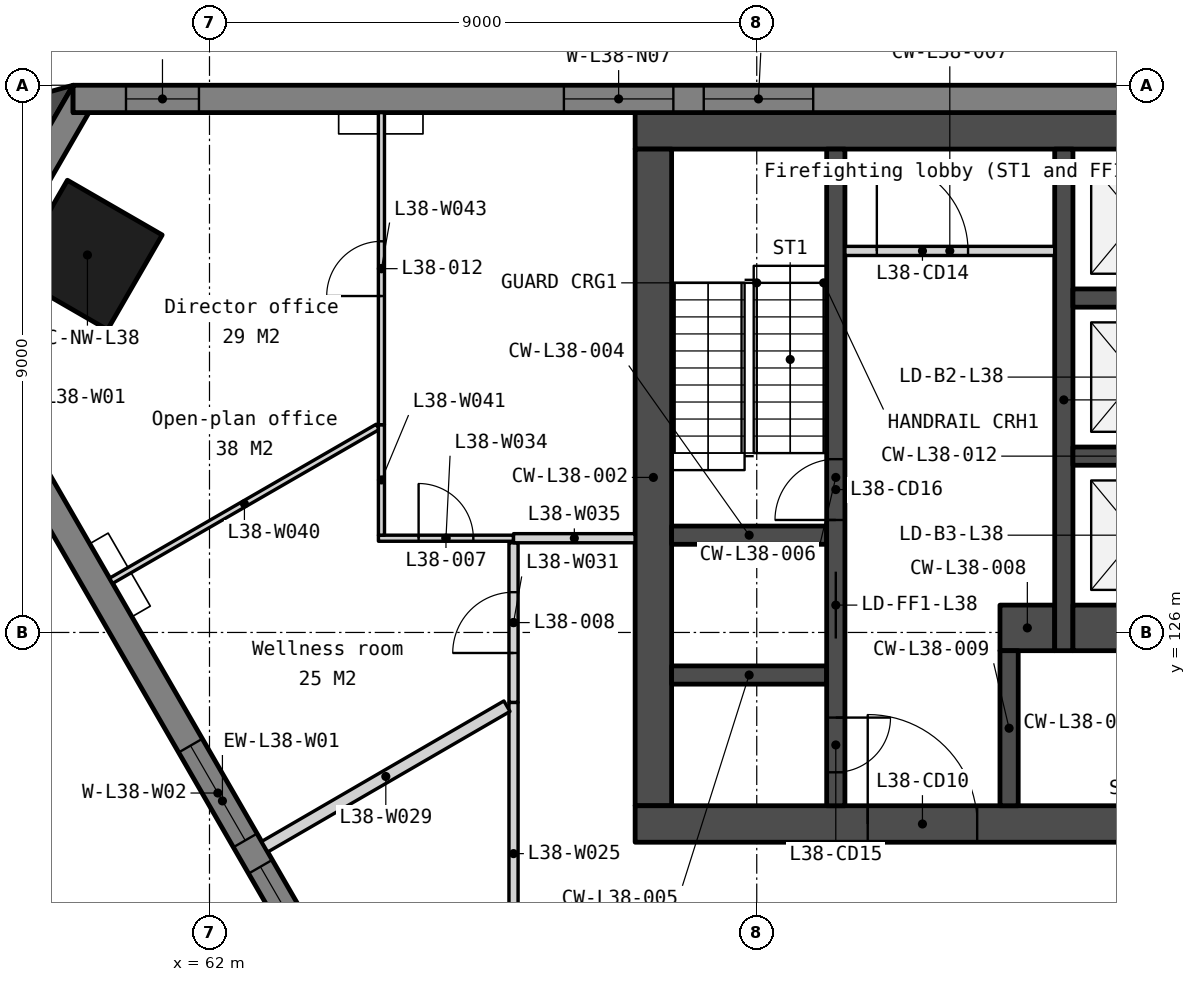
"""IFC4 building model, lengths in metres.
Left out: names, types, materials, properties, quantities, classifications, styles, units other than length and angle.
Written with IfcOpenShell. Run it as: python <this file> out.ifc"""

import sys

from ifc_helpers import new_model, si_unit, direction, frame, frame_2d, origin, origin_2d, place, context, subcontext, project, spatial, polyline, rectangle, outline, extrude, element, fill, save


model = new_model("IFC4")
c1 = context("Model", 3, precision=1e-05, world=origin(), true_north=direction((0.0, 1.0)))
c2 = subcontext(c1, "Body", "Model", "MODEL_VIEW")
j1 = project(units=[si_unit("LENGTHUNIT", "METRE"), si_unit("PLANEANGLEUNIT", "RADIAN")], contexts=[c1])
p1 = place(None, origin())
s1 = spatial("IfcSite", under=j1, at=p1, CompositionType="ELEMENT")
p2 = place(p1, origin())
s2 = spatial("IfcBuilding", under=s1, at=p2, CompositionType="ELEMENT")
p3 = place(p2, frame((0.0, 0.0, 152.0)))
s3 = spatial("IfcBuildingStorey", under=s2, at=p3, CompositionType="ELEMENT", Elevation=152.0)
p4 = place(p3, frame((59.993, 132.208, 0.0), z_axis=(0.0, 0.0, 1.0), x_axis=(-0.5, -0.866025403784, 0.0)))
e1 = element("IfcColumn", 1, at=p4, inside=s3, PredefinedType="COLUMN", context=c2, shape_type="SweptSolid", body=[
    extrude(rectangle(XDim=1.8, YDim=1.8, at=origin_2d()), origin(), (0.0, 0.0, 1.0), 3.9),
])
p5 = place(p3, frame((69.0, 134.25, 0.0), z_axis=(0.0, 0.0, 1.0), x_axis=(1.0, 0.0, 0.0)))
e2 = element("IfcWall", 2, at=p5, inside=s3, PredefinedType="SOLIDWALL", context=c2, shape_type="SweptSolid", body=[
    extrude(rectangle(XDim=22.0, YDim=0.6, at=frame_2d((11.0, 0.0))), origin(), (0.0, 0.0, 1.0), 3.75),
])
p6 = place(p3, frame((69.3, 133.95, 0.0), z_axis=(0.0, 0.0, 1.0), x_axis=(0.0, -1.0, 0.0)))
e3 = element("IfcWall", 3, at=p6, inside=s3, PredefinedType="SOLIDWALL", context=c2, shape_type="SweptSolid", body=[
    extrude(rectangle(XDim=10.8, YDim=0.6, at=frame_2d((5.4, 0.0))), origin(), (0.0, 0.0, 1.0), 3.75),
])
p7 = place(p3, frame((69.0, 122.85, 0.0), z_axis=(0.0, 0.0, 1.0), x_axis=(1.0, 0.0, 0.0)))
e4 = element("IfcWall", 4, at=p7, inside=s3, PredefinedType="SOLIDWALL", context=c2, shape_type="SweptSolid", body=[
    extrude(rectangle(XDim=22.0, YDim=0.6, at=frame_2d((11.0, 0.0))), origin(), (0.0, 0.0, 1.0), 3.75),
])
p8 = place(p7, frame((16.375, 0.0, 0.0)))
e5 = element("IfcOpeningElement", 5, at=p8, cuts=e4, PredefinedType="OPENING", context=c2, shape_type="SweptSolid", body=[
    extrude(rectangle(XDim=1.8, YDim=2.1, at=frame_2d((0.9, 1.05))), frame((0.0, 0.31, 0.0), z_axis=(0.0, -1.0, 0.0), x_axis=(1.0, 0.0, 0.0)), (0.0, 0.0, 1.0), 0.62),
])
p9 = place(p7, frame((3.825, 0.0, 0.0)))
e6 = element("IfcOpeningElement", 6, at=p9, cuts=e4, PredefinedType="OPENING", context=c2, shape_type="SweptSolid", body=[
    extrude(rectangle(XDim=1.8, YDim=2.1, at=frame_2d((0.9, 1.05))), frame((0.0, 0.31, 0.0), z_axis=(0.0, -1.0, 0.0), x_axis=(1.0, 0.0, 0.0)), (0.0, 0.0, 1.0), 0.62),
])
p10 = place(p7, frame((12.85, 0.0, 0.0)))
e7 = element("IfcOpeningElement", 7, at=p10, cuts=e4, PredefinedType="OPENING", context=c2, shape_type="SweptSolid", body=[
    extrude(rectangle(XDim=1.5, YDim=2.1, at=frame_2d((0.75, 1.05))), frame((0.0, 0.31, 0.0), z_axis=(0.0, -1.0, 0.0), x_axis=(1.0, 0.0, 0.0)), (0.0, 0.0, 1.0), 0.62),
])
for number, where, z_axis, x_axis in (
    (8, (69.6, 127.6, 0.0), (0.0, 0.0, 1.0), (1.0, 0.0, 0.0)),
    (9, (69.6, 125.3, 0.0), (0.0, 0.0, 1.0), (1.0, 0.0, 0.0)),
):
    element("IfcWall", number, at=place(p3, frame(where, z_axis=z_axis, x_axis=x_axis)), inside=s3, PredefinedType="SOLIDWALL", context=c2, shape_type="SweptSolid", body=[
        extrude(rectangle(XDim=2.55, YDim=0.3, at=frame_2d((1.275, 0.0))), origin(), (0.0, 0.0, 1.0), 3.75),
    ])
p11 = place(p3, frame((72.3, 133.95, 0.0), z_axis=(0.0, 0.0, 1.0), x_axis=(0.0, -1.0, 0.0)))
e10 = element("IfcWall", 10, at=p11, inside=s3, PredefinedType="SOLIDWALL", context=c2, shape_type="SweptSolid", body=[
    extrude(rectangle(XDim=10.8, YDim=0.3, at=frame_2d((5.4, 0.0))), origin(), (0.0, 0.0, 1.0), 3.75),
])
p12 = place(p11, frame((6.95, 0.0, 0.0)))
e11 = element("IfcOpeningElement", 11, at=p12, cuts=e10, PredefinedType="OPENING", context=c2, shape_type="SweptSolid", body=[
    extrude(rectangle(XDim=1.1, YDim=2.1, at=frame_2d((0.55, 1.05))), frame((0.0, 0.16, 0.0), z_axis=(0.0, -1.0, 0.0), x_axis=(1.0, 0.0, 0.0)), (0.0, 0.0, 1.0), 0.32),
])
p13 = place(p11, frame((9.35, 0.0, 0.0)))
e12 = element("IfcOpeningElement", 12, at=p13, cuts=e10, PredefinedType="OPENING", context=c2, shape_type="SweptSolid", body=[
    extrude(rectangle(XDim=0.9, YDim=2.1, at=frame_2d((0.45, 1.05))), frame((0.0, 0.16, 0.0), z_axis=(0.0, -1.0, 0.0), x_axis=(1.0, 0.0, 0.0)), (0.0, 0.0, 1.0), 0.32),
])
p14 = place(p11, frame((5.1, 0.0, 0.0)))
e13 = element("IfcOpeningElement", 13, at=p14, cuts=e10, PredefinedType="OPENING", context=c2, shape_type="SweptSolid", body=[
    extrude(rectangle(XDim=1.0, YDim=2.1, at=frame_2d((0.5, 1.05))), frame((0.0, 0.16, 0.0), z_axis=(0.0, -1.0, 0.0), x_axis=(1.0, 0.0, 0.0)), (0.0, 0.0, 1.0), 0.32),
])
p15 = place(p3, frame((72.45, 132.275, 0.0), z_axis=(0.0, 0.0, 1.0), x_axis=(1.0, 0.0, 0.0)))
e14 = element("IfcWall", 14, at=p15, inside=s3, PredefinedType="PARTITIONING", context=c2, shape_type="SweptSolid", body=[
    extrude(rectangle(XDim=3.45, YDim=0.15, at=frame_2d((1.725, 0.0))), origin(), (0.0, 0.0, 1.0), 3.75),
])
p16 = place(p15, frame((0.525, 0.0, 0.0)))
e15 = element("IfcOpeningElement", 15, at=p16, cuts=e14, PredefinedType="OPENING", context=c2, shape_type="SweptSolid", body=[
    extrude(rectangle(XDim=1.5, YDim=2.1, at=frame_2d((0.75, 1.05))), frame((0.0, 0.085, 0.0), z_axis=(0.0, -1.0, 0.0), x_axis=(1.0, 0.0, 0.0)), (0.0, 0.0, 1.0), 0.17),
])
p17 = place(p3, frame((75.0, 126.075, 0.0), z_axis=(0.0, 0.0, 1.0), x_axis=(1.0, 0.0, 0.0)))
e16 = element("IfcWall", 16, at=p17, inside=s3, PredefinedType="SOLIDWALL", context=c2, shape_type="SweptSolid", body=[
    extrude(rectangle(XDim=0.9, YDim=0.75, at=frame_2d((0.45, 0.0))), origin(), (0.0, 0.0, 1.0), 3.75),
])
p18 = place(p3, frame((75.15, 125.7, 0.0), z_axis=(0.0, 0.0, 1.0), x_axis=(0.0, -1.0, 0.0)))
e17 = element("IfcWall", 17, at=p18, inside=s3, PredefinedType="SOLIDWALL", context=c2, shape_type="SweptSolid", body=[
    extrude(rectangle(XDim=2.55, YDim=0.3, at=frame_2d((1.275, 0.0))), origin(), (0.0, 0.0, 1.0), 3.75),
])
p19 = place(p3, frame((76.05, 133.95, 0.0), z_axis=(0.0, 0.0, 1.0), x_axis=(0.0, -1.0, 0.0)))
e18 = element("IfcWall", 18, at=p19, inside=s3, PredefinedType="SOLIDWALL", context=c2, shape_type="SweptSolid", body=[
    extrude(rectangle(XDim=8.25, YDim=0.3, at=frame_2d((4.125, 0.0))), origin(), (0.0, 0.0, 1.0), 3.75),
])
for number, where, z_axis, x_axis in (
    (19, (76.2, 131.5, 0.0), (0.0, 0.0, 1.0), (1.0, 0.0, 0.0)),
    (20, (76.2, 128.9, 0.0), (0.0, 0.0, 1.0), (1.0, 0.0, 0.0)),
):
    element("IfcWall", number, at=place(p3, frame(where, z_axis=z_axis, x_axis=x_axis)), inside=s3, PredefinedType="SOLIDWALL", context=c2, shape_type="SweptSolid", body=[
        extrude(rectangle(XDim=2.1, YDim=0.3, at=frame_2d((1.05, 0.0))), origin(), (0.0, 0.0, 1.0), 3.75),
    ])
p20 = place(p3, frame((76.2, 126.075, 0.0), z_axis=(0.0, 0.0, 1.0), x_axis=(1.0, 0.0, 0.0)))
e21 = element("IfcWall", 21, at=p20, inside=s3, PredefinedType="SOLIDWALL", context=c2, shape_type="SweptSolid", body=[
    extrude(rectangle(XDim=2.1, YDim=0.75, at=frame_2d((1.05, 0.0))), origin(), (0.0, 0.0, 1.0), 3.75),
])
p21 = place(p3, frame((0.0, 0.0, -0.15)))
e22 = element("IfcWall", 22, at=p21, inside=s3, PredefinedType="SOLIDWALL", context=c2, shape_type="SweptSolid", body=[
    extrude(outline(polyline([(59.757, 135.0), (59.757, 134.55), (60.017, 134.55), (57.977, 131.016), (57.847, 131.241), (57.457, 131.016), (59.757, 135.0)])), origin(), (0.0, 0.0, 1.0), 3.9),
])
p22 = place(p3, frame((100.243, 134.775, -0.15), z_axis=(0.0, 0.0, 1.0), x_axis=(-1.0, 0.0, 0.0)))
e23 = element("IfcWall", 23, at=p22, inside=s3, PredefinedType="SOLIDWALL", context=c2, shape_type="SweptSolid", body=[
    extrude(outline(polyline([(40.486, 0.0), (40.486, 3.9), (0.0, 3.9), (0.0, 0.0), (40.486, 0.0)])), frame((0.0, 0.225, 0.0), z_axis=(0.0, -1.0, 0.0), x_axis=(1.0, 0.0, 0.0)), (0.0, 0.0, 1.0), 0.45),
])
p23 = place(p22, frame((0.87, 0.0, 0.95)))
e24 = element("IfcOpeningElement", 24, at=p23, cuts=e23, PredefinedType="OPENING", context=c2, shape_type="SweptSolid", body=[
    extrude(rectangle(XDim=1.2, YDim=2.2, at=frame_2d((0.6, 1.1))), frame((0.0, 0.235, 0.0), z_axis=(0.0, -1.0, 0.0), x_axis=(1.0, 0.0, 0.0)), (0.0, 0.0, 1.0), 0.47),
])
p24 = place(p22, frame((8.072, 0.0, 0.95)))
e25 = element("IfcOpeningElement", 25, at=p24, cuts=e23, PredefinedType="OPENING", context=c2, shape_type="SweptSolid", body=[
    extrude(rectangle(XDim=1.8, YDim=2.2, at=frame_2d((0.9, 1.1))), frame((0.0, 0.235, 0.0), z_axis=(0.0, -1.0, 0.0), x_axis=(1.0, 0.0, 0.0)), (0.0, 0.0, 1.0), 0.47),
])
p25 = place(p22, frame((10.372, 0.0, 0.95)))
e26 = element("IfcOpeningElement", 26, at=p25, cuts=e23, PredefinedType="OPENING", context=c2, shape_type="SweptSolid", body=[
    extrude(rectangle(XDim=1.8, YDim=2.2, at=frame_2d((0.9, 1.1))), frame((0.0, 0.235, 0.0), z_axis=(0.0, -1.0, 0.0), x_axis=(1.0, 0.0, 0.0)), (0.0, 0.0, 1.0), 0.47),
])
p26 = place(p22, frame((18.193, 0.0, 0.95)))
e27 = element("IfcOpeningElement", 27, at=p26, cuts=e23, PredefinedType="OPENING", context=c2, shape_type="SweptSolid", body=[
    extrude(rectangle(XDim=1.8, YDim=2.2, at=frame_2d((0.9, 1.1))), frame((0.0, 0.235, 0.0), z_axis=(0.0, -1.0, 0.0), x_axis=(1.0, 0.0, 0.0)), (0.0, 0.0, 1.0), 0.47),
])
p27 = place(p22, frame((20.493, 0.0, 0.95)))
e28 = element("IfcOpeningElement", 28, at=p27, cuts=e23, PredefinedType="OPENING", context=c2, shape_type="SweptSolid", body=[
    extrude(rectangle(XDim=1.8, YDim=2.2, at=frame_2d((0.9, 1.1))), frame((0.0, 0.235, 0.0), z_axis=(0.0, -1.0, 0.0), x_axis=(1.0, 0.0, 0.0)), (0.0, 0.0, 1.0), 0.47),
])
p28 = place(p22, frame((28.315, 0.0, 0.95)))
e29 = element("IfcOpeningElement", 29, at=p28, cuts=e23, PredefinedType="OPENING", context=c2, shape_type="SweptSolid", body=[
    extrude(rectangle(XDim=1.8, YDim=2.2, at=frame_2d((0.9, 1.1))), frame((0.0, 0.235, 0.0), z_axis=(0.0, -1.0, 0.0), x_axis=(1.0, 0.0, 0.0)), (0.0, 0.0, 1.0), 0.47),
])
p29 = place(p22, frame((30.615, 0.0, 0.95)))
e30 = element("IfcOpeningElement", 30, at=p29, cuts=e23, PredefinedType="OPENING", context=c2, shape_type="SweptSolid", body=[
    extrude(rectangle(XDim=1.8, YDim=2.2, at=frame_2d((0.9, 1.1))), frame((0.0, 0.235, 0.0), z_axis=(0.0, -1.0, 0.0), x_axis=(1.0, 0.0, 0.0)), (0.0, 0.0, 1.0), 0.47),
])
p30 = place(p22, frame((38.417, 0.0, 0.95)))
e31 = element("IfcOpeningElement", 31, at=p30, cuts=e23, PredefinedType="OPENING", context=c2, shape_type="SweptSolid", body=[
    extrude(rectangle(XDim=1.2, YDim=2.2, at=frame_2d((0.6, 1.1))), frame((0.0, 0.235, 0.0), z_axis=(0.0, -1.0, 0.0), x_axis=(1.0, 0.0, 0.0)), (0.0, 0.0, 1.0), 0.47),
])
p31 = place(p3, frame((57.652, 131.129, -0.15), z_axis=(0.0, 0.0, 1.0), x_axis=(0.50000511266, -0.866022451969, 0.0)))
e32 = element("IfcWall", 32, at=p31, inside=s3, PredefinedType="SOLIDWALL", context=c2, shape_type="SweptSolid", body=[
    extrude(outline(polyline([(0.0, 0.0), (0.0, 3.9), (18.243, 3.9), (18.243, 0.0), (0.0, 0.0)])), frame((0.0, 0.225, 0.0), z_axis=(0.0, -1.0, 0.0), x_axis=(1.0, 0.0, 0.0)), (0.0, 0.0, 1.0), 0.45),
])
p32 = place(p31, frame((0.87, 0.0, 0.95)))
e33 = element("IfcOpeningElement", 33, at=p32, cuts=e32, PredefinedType="OPENING", context=c2, shape_type="SweptSolid", body=[
    extrude(rectangle(XDim=1.2, YDim=2.2, at=frame_2d((0.6, 1.1))), frame((0.0, 0.235, 0.0), z_axis=(0.0, -1.0, 0.0), x_axis=(1.0, 0.0, 0.0)), (0.0, 0.0, 1.0), 0.47),
])
p33 = place(p31, frame((8.072, 0.0, 0.95)))
e34 = element("IfcOpeningElement", 34, at=p33, cuts=e32, PredefinedType="OPENING", context=c2, shape_type="SweptSolid", body=[
    extrude(rectangle(XDim=1.8, YDim=2.2, at=frame_2d((0.9, 1.1))), frame((0.0, 0.235, 0.0), z_axis=(0.0, -1.0, 0.0), x_axis=(1.0, 0.0, 0.0)), (0.0, 0.0, 1.0), 0.47),
])
p34 = place(p31, frame((10.372, 0.0, 0.95)))
e35 = element("IfcOpeningElement", 35, at=p34, cuts=e32, PredefinedType="OPENING", context=c2, shape_type="SweptSolid", body=[
    extrude(rectangle(XDim=1.8, YDim=2.2, at=frame_2d((0.9, 1.1))), frame((0.0, 0.235, 0.0), z_axis=(0.0, -1.0, 0.0), x_axis=(1.0, 0.0, 0.0)), (0.0, 0.0, 1.0), 0.47),
])
p35 = place(p3, frame((0.0, 0.0, -0.15)))
e36 = element("IfcWall", 36, at=p35, inside=s3, PredefinedType="SOLIDWALL", context=c2, shape_type="SweptSolid", body=[
    extrude(outline(polyline([(59.757, 135.0), (56.512, 134.097), (57.457, 131.016), (59.757, 135.0)])), origin(), (0.0, 0.0, 1.0), 3.9),
])
p36 = place(p3, frame((67.0, 119.875, 0.0), z_axis=(0.0, 0.0, 1.0), x_axis=(0.0, 1.0, 0.0)))
e37 = element("IfcWall", 37, at=p36, inside=s3, PredefinedType="PARTITIONING", context=c2, shape_type="SweptSolid", body=[
    extrude(rectangle(XDim=4.975, YDim=0.15, at=frame_2d((2.487, 0.0))), origin(), (0.0, 0.0, 1.0), 3.75),
])
p37 = place(p3, frame((62.907, 122.476, 0.0), z_axis=(0.0, 0.0, 1.0), x_axis=(0.864998983095, 0.501773613539, 0.0)))
e38 = element("IfcWall", 38, at=p37, inside=s3, PredefinedType="PARTITIONING", context=c2, shape_type="SweptSolid", body=[
    extrude(rectangle(XDim=4.606, YDim=0.2, at=frame_2d((2.303, 0.0))), origin(), (0.0, 0.0, 1.0), 3.75),
])
p38 = place(p3, frame((67.0, 124.85, 0.0), z_axis=(0.0, 0.0, 1.0), x_axis=(0.0, 1.0, 0.0)))
e39 = element("IfcWall", 39, at=p38, inside=s3, PredefinedType="PARTITIONING", context=c2, shape_type="SweptSolid", body=[
    extrude(rectangle(XDim=2.625, YDim=0.15, at=frame_2d((1.312, 0.0))), origin(), (0.0, 0.0, 1.0), 3.75),
])
p39 = place(p38, frame((0.812, 0.0, 0.0)))
e40 = element("IfcOpeningElement", 40, at=p39, cuts=e39, PredefinedType="OPENING", context=c2, shape_type="SweptSolid", body=[
    extrude(rectangle(XDim=1.0, YDim=2.1, at=frame_2d((0.5, 1.05))), frame((0.0, 0.085, 0.0), z_axis=(0.0, -1.0, 0.0), x_axis=(1.0, 0.0, 0.0)), (0.0, 0.0, 1.0), 0.17),
])
p40 = place(p3, frame((64.778, 127.55, 0.0), z_axis=(0.0, 0.0, 1.0), x_axis=(1.0, 0.0, 0.0)))
e41 = element("IfcWall", 41, at=p40, inside=s3, PredefinedType="PARTITIONING", context=c2, shape_type="SweptSolid", body=[
    extrude(rectangle(XDim=2.222, YDim=0.1, at=frame_2d((1.111, 0.0))), origin(), (0.0, 0.0, 1.0), 3.75),
])
p41 = place(p40, frame((0.661, 0.0, 0.0)))
e42 = element("IfcOpeningElement", 42, at=p41, cuts=e41, PredefinedType="OPENING", context=c2, shape_type="SweptSolid", body=[
    extrude(rectangle(XDim=0.9, YDim=2.1, at=frame_2d((0.45, 1.05))), frame((0.0, 0.06, 0.0), z_axis=(0.0, -1.0, 0.0), x_axis=(1.0, 0.0, 0.0)), (0.0, 0.0, 1.0), 0.12),
])
p42 = place(p3, frame((67.0, 127.55, 0.0), z_axis=(0.0, 0.0, 1.0), x_axis=(1.0, 0.0, 0.0)))
e43 = element("IfcWall", 43, at=p42, inside=s3, PredefinedType="PARTITIONING", context=c2, shape_type="SweptSolid", body=[
    extrude(rectangle(XDim=2.0, YDim=0.15, at=frame_2d((1.0, 0.0))), origin(), (0.0, 0.0, 1.0), 3.75),
])
p43 = place(p3, frame((60.382, 126.85, 0.0), z_axis=(0.0, 0.0, 1.0), x_axis=(0.866041859802, 0.499971496258, 0.0)))
e44 = element("IfcWall", 44, at=p43, inside=s3, PredefinedType="PARTITIONING", context=c2, shape_type="SweptSolid", body=[
    extrude(rectangle(XDim=5.063, YDim=0.1, at=frame_2d((2.532, 0.0))), origin(), (0.0, 0.0, 1.0), 3.75),
])
p44 = place(p3, frame((64.828, 127.6, 0.0), z_axis=(0.0, 0.0, 1.0), x_axis=(-0.000268781068, 0.999999963878, 0.0)))
e45 = element("IfcWall", 45, at=p44, inside=s3, PredefinedType="PARTITIONING", context=c2, shape_type="SweptSolid", body=[
    extrude(rectangle(XDim=1.817, YDim=0.1, at=frame_2d((0.908, 0.0))), origin(), (0.0, 0.0, 1.0), 3.75),
])
p45 = place(p3, frame((64.828, 129.417, 0.0), z_axis=(0.0, 0.0, 1.0), x_axis=(0.0, 1.0, 0.0)))
e46 = element("IfcWall", 46, at=p45, inside=s3, PredefinedType="PARTITIONING", context=c2, shape_type="SweptSolid", body=[
    extrude(rectangle(XDim=5.133, YDim=0.1, at=frame_2d((2.567, 0.0))), origin(), (0.0, 0.0, 1.0), 3.75),
])
p46 = place(p45, frame((2.117, 0.0, 0.0)))
e47 = element("IfcOpeningElement", 47, at=p46, cuts=e46, PredefinedType="OPENING", context=c2, shape_type="SweptSolid", body=[
    extrude(rectangle(XDim=0.9, YDim=2.1, at=frame_2d((0.45, 1.05))), frame((0.0, 0.06, 0.0), z_axis=(0.0, -1.0, 0.0), x_axis=(1.0, 0.0, 0.0)), (0.0, 0.0, 1.0), 0.12),
])
p47 = place(p12, origin())
e48 = element("IfcDoor", 48, at=p47, inside=s3, OperationType="SLIDING_TO_LEFT", PredefinedType="DOOR", context=c2, shape_type="SweptSolid", body=[
    extrude(rectangle(XDim=1.1, YDim=2.1, at=frame_2d((0.55, 1.05))), frame((0.0, 0.025, 0.0), z_axis=(0.0, -1.0, 0.0), x_axis=(1.0, 0.0, 0.0)), (0.0, 0.0, 1.0), 0.05),
])
fill(e11, e48)
p48 = place(p9, origin())
e49 = element("IfcDoor", 49, at=p48, inside=s3, OperationType="DOUBLE_DOOR_DOUBLE_SWING", PredefinedType="DOOR", context=c2, shape_type="SweptSolid", body=[
    extrude(rectangle(XDim=1.8, YDim=2.1, at=frame_2d((0.9, 1.05))), frame((0.0, 0.025, 0.0), z_axis=(0.0, -1.0, 0.0), x_axis=(1.0, 0.0, 0.0)), (0.0, 0.0, 1.0), 0.05),
])
fill(e6, e49)
p49 = place(p16, origin())
e50 = element("IfcDoor", 50, at=p49, inside=s3, OperationType="DOUBLE_DOOR_DOUBLE_SWING", PredefinedType="DOOR", context=c2, shape_type="SweptSolid", body=[
    extrude(rectangle(XDim=1.5, YDim=2.1, at=frame_2d((0.75, 1.05))), frame((0.0, 0.025, 0.0), z_axis=(0.0, -1.0, 0.0), x_axis=(1.0, 0.0, 0.0)), (0.0, 0.0, 1.0), 0.05),
])
fill(e15, e50)
p50 = place(p13, origin())
e51 = element("IfcDoor", 51, at=p50, inside=s3, OperationType="SINGLE_SWING_LEFT", PredefinedType="DOOR", context=c2, shape_type="SweptSolid", body=[
    extrude(rectangle(XDim=0.9, YDim=2.1, at=frame_2d((0.45, 1.05))), frame((0.0, 0.025, 0.0), z_axis=(0.0, -1.0, 0.0), x_axis=(1.0, 0.0, 0.0)), (0.0, 0.0, 1.0), 0.05),
])
fill(e12, e51)
p51 = place(p14, origin())
e52 = element("IfcDoor", 52, at=p51, inside=s3, OperationType="SINGLE_SWING_RIGHT", PredefinedType="DOOR", context=c2, shape_type="SweptSolid", body=[
    extrude(rectangle(XDim=1.0, YDim=2.1, at=frame_2d((0.5, 1.05))), frame((0.0, 0.025, 0.0), z_axis=(0.0, -1.0, 0.0), x_axis=(1.0, 0.0, 0.0)), (0.0, 0.0, 1.0), 0.05),
])
fill(e13, e52)
p52 = place(p28, origin())
e53 = element("IfcWindow", 53, at=p52, inside=s3, PartitioningType="SINGLE_PANEL", PredefinedType="WINDOW", context=c2, shape_type="SweptSolid", body=[
    extrude(rectangle(XDim=1.8, YDim=2.2, at=frame_2d((0.9, 1.1))), frame((0.0, 0.03, 0.0), z_axis=(0.0, -1.0, 0.0), x_axis=(1.0, 0.0, 0.0)), (0.0, 0.0, 1.0), 0.06),
])
fill(e29, e53)
p53 = place(p29, origin())
e54 = element("IfcWindow", 54, at=p53, inside=s3, PartitioningType="SINGLE_PANEL", PredefinedType="WINDOW", context=c2, shape_type="SweptSolid", body=[
    extrude(rectangle(XDim=1.8, YDim=2.2, at=frame_2d((0.9, 1.1))), frame((0.0, 0.03, 0.0), z_axis=(0.0, -1.0, 0.0), x_axis=(1.0, 0.0, 0.0)), (0.0, 0.0, 1.0), 0.06),
])
fill(e30, e54)
p54 = place(p30, origin())
e55 = element("IfcWindow", 55, at=p54, inside=s3, PartitioningType="SINGLE_PANEL", PredefinedType="WINDOW", context=c2, shape_type="SweptSolid", body=[
    extrude(rectangle(XDim=1.2, YDim=2.2, at=frame_2d((0.6, 1.1))), frame((0.0, 0.03, 0.0), z_axis=(0.0, -1.0, 0.0), x_axis=(1.0, 0.0, 0.0)), (0.0, 0.0, 1.0), 0.06),
])
fill(e31, e55)
p55 = place(p33, origin())
e56 = element("IfcWindow", 56, at=p55, inside=s3, PartitioningType="SINGLE_PANEL", PredefinedType="WINDOW", context=c2, shape_type="SweptSolid", body=[
    extrude(rectangle(XDim=1.8, YDim=2.2, at=frame_2d((0.9, 1.1))), frame((0.0, 0.03, 0.0), z_axis=(0.0, -1.0, 0.0), x_axis=(1.0, 0.0, 0.0)), (0.0, 0.0, 1.0), 0.06),
])
fill(e34, e56)
p56 = place(p34, origin())
e57 = element("IfcWindow", 57, at=p56, inside=s3, PartitioningType="SINGLE_PANEL", PredefinedType="WINDOW", context=c2, shape_type="SweptSolid", body=[
    extrude(rectangle(XDim=1.8, YDim=2.2, at=frame_2d((0.9, 1.1))), frame((0.0, 0.03, 0.0), z_axis=(0.0, -1.0, 0.0), x_axis=(1.0, 0.0, 0.0)), (0.0, 0.0, 1.0), 0.06),
])
fill(e35, e57)
p57 = place(p41, origin())
e58 = element("IfcDoor", 58, at=p57, inside=s3, OperationType="SINGLE_SWING_LEFT", PredefinedType="DOOR", context=c2, shape_type="SweptSolid", body=[
    extrude(rectangle(XDim=0.9, YDim=2.1, at=frame_2d((0.45, 1.05))), frame((0.0, 0.025, 0.0), z_axis=(0.0, -1.0, 0.0), x_axis=(1.0, 0.0, 0.0)), (0.0, 0.0, 1.0), 0.05),
])
fill(e42, e58)
p58 = place(p39, origin())
e59 = element("IfcDoor", 59, at=p58, inside=s3, OperationType="SINGLE_SWING_LEFT", PredefinedType="DOOR", context=c2, shape_type="SweptSolid", body=[
    extrude(rectangle(XDim=1.0, YDim=2.1, at=frame_2d((0.5, 1.05))), frame((0.0, 0.025, 0.0), z_axis=(0.0, -1.0, 0.0), x_axis=(1.0, 0.0, 0.0)), (0.0, 0.0, 1.0), 0.05),
])
fill(e40, e59)
p59 = place(p46, origin())
e60 = element("IfcDoor", 60, at=p59, inside=s3, OperationType="SINGLE_SWING_LEFT", PredefinedType="DOOR", context=c2, shape_type="SweptSolid", body=[
    extrude(rectangle(XDim=0.9, YDim=2.1, at=frame_2d((0.45, 1.05))), frame((0.0, 0.025, 0.0), z_axis=(0.0, -1.0, 0.0), x_axis=(1.0, 0.0, 0.0)), (0.0, 0.0, 1.0), 0.05),
])
fill(e47, e60)
save(model, sys.argv[1])
